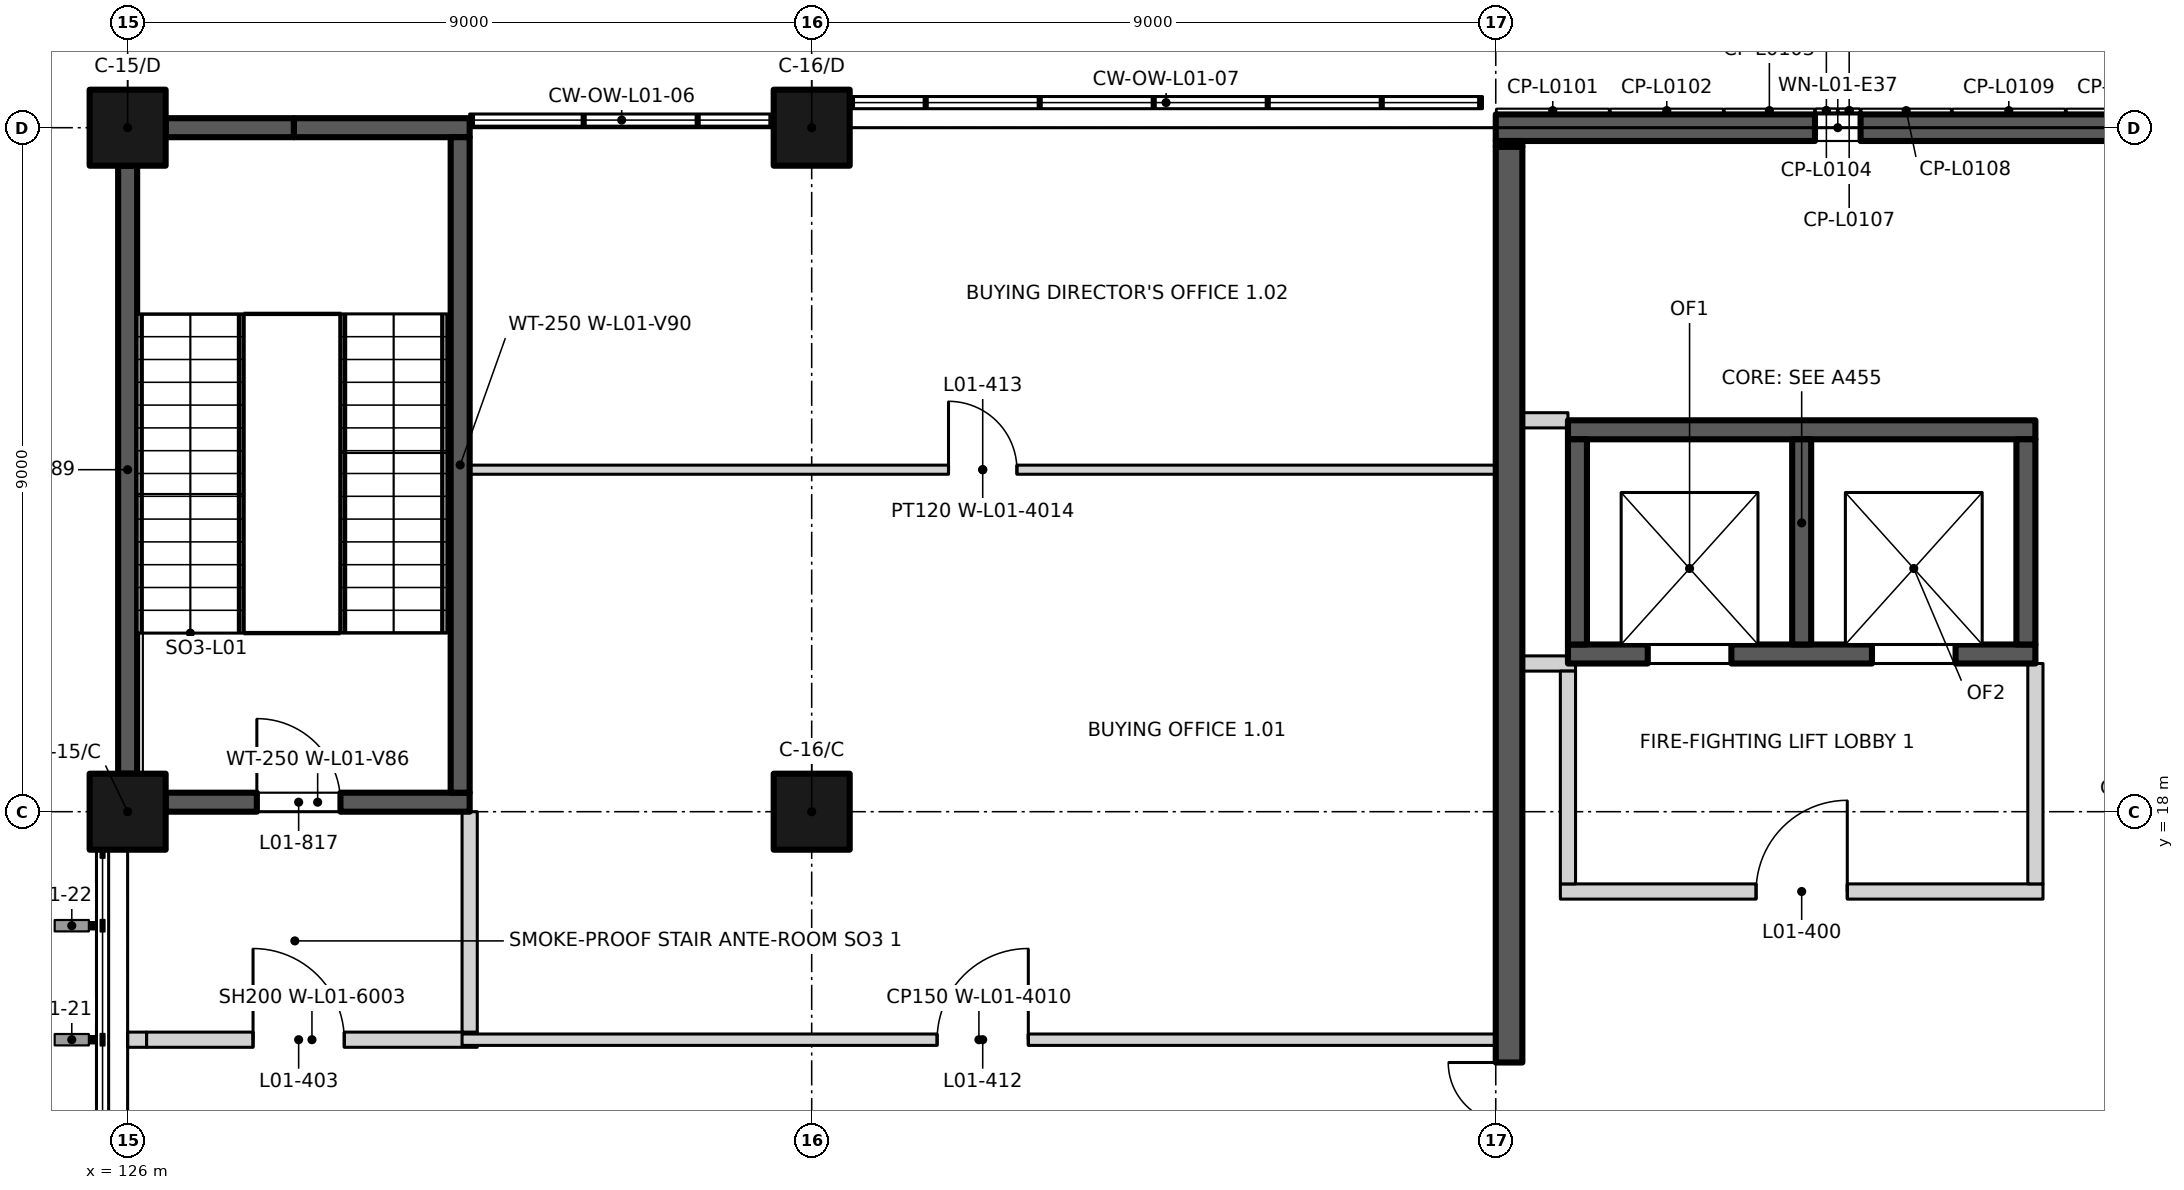
"""IFC4 building model, lengths in metres.
Left out: names, types, materials, properties, quantities, classifications, styles, units other than length and angle.
Written with IfcOpenShell. Run it as: python <this file> out.ifc"""

import sys

from ifc_helpers import new_model, si_unit, direction, frame, frame_2d, origin, origin_2d, place, context, subcontext, project, spatial, rectangle, extrude, element, fill, save


model = new_model("IFC4")
c1 = context("Model", 3, precision=1e-05, world=origin(), true_north=direction((0.0, 1.0)))
c2 = subcontext(c1, "Body", "Model", "MODEL_VIEW")
j1 = project(units=[si_unit("LENGTHUNIT", "METRE"), si_unit("PLANEANGLEUNIT", "RADIAN")], contexts=[c1])
p1 = place(None, origin())
s1 = spatial("IfcSite", under=j1, at=p1, CompositionType="ELEMENT")
p2 = place(p1, origin())
s2 = spatial("IfcBuilding", under=s1, at=p2, CompositionType="ELEMENT")
p3 = place(p2, frame((0.0, 0.0, 6.0)))
s3 = spatial("IfcBuildingStorey", under=s2, at=p3, CompositionType="ELEMENT", Elevation=6.0)
for number, where, z_axis, x_axis in (
    (1, (126.0, 18.0, 0.0), (0.0, 0.0, 1.0), (1.0, 0.0, 0.0)),
    (2, (135.0, 18.0, 0.0), (0.0, 0.0, 1.0), (1.0, 0.0, 0.0)),
    (3, (126.0, 27.0, 0.0), (0.0, 0.0, 1.0), (1.0, 0.0, 0.0)),
    (4, (135.0, 27.0, 0.0), (0.0, 0.0, 1.0), (1.0, 0.0, 0.0)),
):
    element("IfcColumn", number, at=place(p3, frame(where, z_axis=z_axis, x_axis=x_axis)), inside=s3, PredefinedType="COLUMN", context=c2, shape_type="SweptSolid", body=[
        extrude(rectangle(XDim=1.0, YDim=1.0, at=origin_2d()), origin(), (0.0, 0.0, 1.0), 4.5),
    ])
p4 = place(p3, frame((126.5, 18.125, 0.0), z_axis=(0.0, 0.0, 1.0), x_axis=(1.0, 0.0, 0.0)))
e5 = element("IfcWall", 5, at=p4, inside=s3, PredefinedType="SHEAR", context=c2, shape_type="SweptSolid", body=[
    extrude(rectangle(XDim=4.0, YDim=0.25, at=frame_2d((2.0, 0.0))), origin(), (0.0, 0.0, 1.0), 4.5),
])
p5 = place(p4, frame((1.2, 0.0, 0.0)))
e6 = element("IfcOpeningElement", 6, at=p5, cuts=e5, PredefinedType="OPENING", context=c2, shape_type="SweptSolid", body=[
    extrude(rectangle(XDim=1.1, YDim=2.1, at=frame_2d((0.55, 1.05))), frame((0.0, 0.135, 0.0), z_axis=(0.0, -1.0, 0.0), x_axis=(1.0, 0.0, 0.0)), (0.0, 0.0, 1.0), 0.27),
])
p6 = place(p3, frame((126.5, 27.0, 0.0), z_axis=(0.0, 0.0, 1.0), x_axis=(1.0, 0.0, 0.0)))
e7 = element("IfcWall", 7, at=p6, inside=s3, PredefinedType="SHEAR", context=c2, shape_type="SweptSolid", body=[
    extrude(rectangle(XDim=1.688, YDim=0.25, at=frame_2d((0.844, 0.0))), origin(), (0.0, 0.0, 1.0), 4.5),
])
p7 = place(p3, frame((128.188, 27.0, 0.0), z_axis=(0.0, 0.0, 1.0), x_axis=(1.0, 0.0, 0.0)))
e8 = element("IfcWall", 8, at=p7, inside=s3, PredefinedType="SHEAR", context=c2, shape_type="SweptSolid", body=[
    extrude(rectangle(XDim=2.312, YDim=0.25, at=frame_2d((1.156, 0.0))), origin(), (0.0, 0.0, 1.0), 4.5),
])
p8 = place(p3, frame((126.0, 18.5, 0.0), z_axis=(0.0, 0.0, 1.0), x_axis=(0.0, 1.0, 0.0)))
e9 = element("IfcWall", 9, at=p8, inside=s3, PredefinedType="SHEAR", context=c2, shape_type="SweptSolid", body=[
    extrude(rectangle(XDim=8.0, YDim=0.25, at=frame_2d((4.0, 0.0))), origin(), (0.0, 0.0, 1.0), 4.5),
])
p9 = place(p3, frame((130.375, 18.25, 0.0), z_axis=(0.0, 0.0, 1.0), x_axis=(0.0, 1.0, 0.0)))
e10 = element("IfcWall", 10, at=p9, inside=s3, PredefinedType="SHEAR", context=c2, shape_type="SweptSolid", body=[
    extrude(rectangle(XDim=8.625, YDim=0.25, at=frame_2d((4.312, 0.0))), origin(), (0.0, 0.0, 1.0), 4.5),
])
p10 = place(p3, frame((144.95, 20.075, 0.0), z_axis=(0.0, 0.0, 1.0), x_axis=(1.0, 0.0, 0.0)))
e11 = element("IfcWall", 11, at=p10, inside=s3, PredefinedType="SHEAR", context=c2, shape_type="SweptSolid", body=[
    extrude(rectangle(XDim=6.15, YDim=0.25, at=frame_2d((3.075, 0.0))), origin(), (0.0, 0.0, 1.0), 4.5),
])
p11 = place(p10, frame((1.05, 0.0, 0.0)))
e12 = element("IfcOpeningElement", 12, at=p11, cuts=e11, PredefinedType="OPENING", context=c2, shape_type="SweptSolid", body=[
    extrude(rectangle(XDim=1.1, YDim=2.1, at=frame_2d((0.55, 1.05))), frame((0.0, 0.135, 0.0), z_axis=(0.0, -1.0, 0.0), x_axis=(1.0, 0.0, 0.0)), (0.0, 0.0, 1.0), 0.27),
])
p12 = place(p10, frame((4.0, 0.0, 0.0)))
e13 = element("IfcOpeningElement", 13, at=p12, cuts=e11, PredefinedType="OPENING", context=c2, shape_type="SweptSolid", body=[
    extrude(rectangle(XDim=1.1, YDim=2.1, at=frame_2d((0.55, 1.05))), frame((0.0, 0.135, 0.0), z_axis=(0.0, -1.0, 0.0), x_axis=(1.0, 0.0, 0.0)), (0.0, 0.0, 1.0), 0.27),
])
p13 = place(p3, frame((144.95, 23.025, 0.0), z_axis=(0.0, 0.0, 1.0), x_axis=(1.0, 0.0, 0.0)))
e14 = element("IfcWall", 14, at=p13, inside=s3, PredefinedType="SHEAR", context=c2, shape_type="SweptSolid", body=[
    extrude(rectangle(XDim=6.15, YDim=0.25, at=frame_2d((3.075, 0.0))), origin(), (0.0, 0.0, 1.0), 4.5),
])
for number, where, z_axis, x_axis in (
    (15, (145.075, 20.2, 0.0), (0.0, 0.0, 1.0), (0.0, 1.0, 0.0)),
    (16, (148.025, 20.2, 0.0), (0.0, 0.0, 1.0), (0.0, 1.0, 0.0)),
    (17, (150.975, 20.2, 0.0), (0.0, 0.0, 1.0), (0.0, 1.0, 0.0)),
):
    element("IfcWall", number, at=place(p3, frame(where, z_axis=z_axis, x_axis=x_axis)), inside=s3, PredefinedType="SHEAR", context=c2, shape_type="SweptSolid", body=[
        extrude(rectangle(XDim=2.7, YDim=0.25, at=frame_2d((1.35, 0.0))), origin(), (0.0, 0.0, 1.0), 4.5),
    ])
p14 = place(p3, frame((144.0, 27.0, 0.0), z_axis=(0.0, 0.0, 1.0), x_axis=(1.0, 0.0, 0.0)))
e18 = element("IfcWall", 18, at=p14, inside=s3, PredefinedType="SOLIDWALL", context=c2, shape_type="SweptSolid", body=[
    extrude(rectangle(XDim=18.0, YDim=0.35, at=frame_2d((9.0, 0.0))), origin(), (0.0, 0.0, 1.0), 3.6),
])
p15 = place(p14, frame((4.2, 0.0, 0.6)))
e19 = element("IfcOpeningElement", 19, at=p15, cuts=e18, PredefinedType="OPENING", context=c2, shape_type="SweptSolid", body=[
    extrude(rectangle(XDim=0.6, YDim=2.4, at=frame_2d((0.3, 1.2))), frame((0.0, 0.185, 0.0), z_axis=(0.0, -1.0, 0.0), x_axis=(1.0, 0.0, 0.0)), (0.0, 0.0, 1.0), 0.37),
])
p16 = place(p14, frame((13.2, 0.0, 0.6)))
e20 = element("IfcOpeningElement", 20, at=p16, cuts=e18, PredefinedType="OPENING", context=c2, shape_type="SweptSolid", body=[
    extrude(rectangle(XDim=0.6, YDim=2.4, at=frame_2d((0.3, 1.2))), frame((0.0, 0.185, 0.0), z_axis=(0.0, -1.0, 0.0), x_axis=(1.0, 0.0, 0.0)), (0.0, 0.0, 1.0), 0.37),
])
p17 = place(p3, frame((126.0, 15.0, 0.0), z_axis=(0.0, 0.0, 1.0), x_axis=(1.0, 0.0, 0.0)))
e21 = element("IfcWall", 21, at=p17, inside=s3, PredefinedType="PARTITIONING", context=c2, shape_type="SweptSolid", body=[
    extrude(rectangle(XDim=0.25, YDim=0.2, at=frame_2d((0.125, 0.0))), origin(), (0.0, 0.0, 1.0), 3.6),
])
p18 = place(p3, frame((126.25, 15.0, 0.0), z_axis=(0.0, 0.0, 1.0), x_axis=(1.0, 0.0, 0.0)))
e22 = element("IfcWall", 22, at=p18, inside=s3, PredefinedType="PARTITIONING", context=c2, shape_type="SweptSolid", body=[
    extrude(rectangle(XDim=4.35, YDim=0.2, at=frame_2d((2.175, 0.0))), origin(), (0.0, 0.0, 1.0), 4.2),
])
p19 = place(p18, frame((1.4, 0.0, 0.0)))
e23 = element("IfcOpeningElement", 23, at=p19, cuts=e22, PredefinedType="OPENING", context=c2, shape_type="SweptSolid", body=[
    extrude(rectangle(XDim=1.2, YDim=2.1, at=frame_2d((0.6, 1.05))), frame((0.0, 0.11, 0.0), z_axis=(0.0, -1.0, 0.0), x_axis=(1.0, 0.0, 0.0)), (0.0, 0.0, 1.0), 0.22),
])
p20 = place(p3, frame((130.4, 15.0, 0.0), z_axis=(0.0, 0.0, 1.0), x_axis=(1.0, 0.0, 0.0)))
e24 = element("IfcWall", 24, at=p20, inside=s3, PredefinedType="PARTITIONING", context=c2, shape_type="SweptSolid", body=[
    extrude(rectangle(XDim=13.6, YDim=0.15, at=frame_2d((6.8, 0.0))), origin(), (0.0, 0.0, 1.0), 4.2),
])
p21 = place(p20, frame((6.25, 0.0, 0.0)))
e25 = element("IfcOpeningElement", 25, at=p21, cuts=e24, PredefinedType="OPENING", context=c2, shape_type="SweptSolid", body=[
    extrude(rectangle(XDim=1.2, YDim=2.1, at=frame_2d((0.6, 1.05))), frame((0.0, 0.085, 0.0), z_axis=(0.0, -1.0, 0.0), x_axis=(1.0, 0.0, 0.0)), (0.0, 0.0, 1.0), 0.17),
])
p22 = place(p3, frame((144.85, 16.95, 0.0), z_axis=(0.0, 0.0, 1.0), x_axis=(1.0, 0.0, 0.0)))
e26 = element("IfcWall", 26, at=p22, inside=s3, PredefinedType="PARTITIONING", context=c2, shape_type="SweptSolid", body=[
    extrude(rectangle(XDim=6.35, YDim=0.2, at=frame_2d((3.175, 0.0))), origin(), (0.0, 0.0, 1.0), 4.2),
])
p23 = place(p22, frame((2.575, 0.0, 0.0)))
e27 = element("IfcOpeningElement", 27, at=p23, cuts=e26, PredefinedType="OPENING", context=c2, shape_type="SweptSolid", body=[
    extrude(rectangle(XDim=1.2, YDim=2.1, at=frame_2d((0.6, 1.05))), frame((0.0, 0.11, 0.0), z_axis=(0.0, -1.0, 0.0), x_axis=(1.0, 0.0, 0.0)), (0.0, 0.0, 1.0), 0.22),
])
p24 = place(p3, frame((144.35, 19.95, 0.0), z_axis=(0.0, 0.0, 1.0), x_axis=(1.0, 0.0, 0.0)))
e28 = element("IfcWall", 28, at=p24, inside=s3, PredefinedType="PARTITIONING", context=c2, shape_type="SweptSolid", body=[
    extrude(rectangle(XDim=0.7, YDim=0.2, at=frame_2d((0.35, 0.0))), origin(), (0.0, 0.0, 1.0), 4.2),
])
p25 = place(p3, frame((130.5, 22.5, 0.0), z_axis=(0.0, 0.0, 1.0), x_axis=(1.0, 0.0, 0.0)))
e29 = element("IfcWall", 29, at=p25, inside=s3, PredefinedType="PARTITIONING", context=c2, shape_type="SweptSolid", body=[
    extrude(rectangle(XDim=13.5, YDim=0.12, at=frame_2d((6.75, 0.0))), origin(), (0.0, 0.0, 1.0), 4.2),
])
p26 = place(p25, frame((6.3, 0.0, 0.0)))
e30 = element("IfcOpeningElement", 30, at=p26, cuts=e29, PredefinedType="OPENING", context=c2, shape_type="SweptSolid", body=[
    extrude(rectangle(XDim=0.9, YDim=2.1, at=frame_2d((0.45, 1.05))), frame((0.0, 0.07, 0.0), z_axis=(0.0, -1.0, 0.0), x_axis=(1.0, 0.0, 0.0)), (0.0, 0.0, 1.0), 0.14),
])
p27 = place(p3, frame((144.35, 23.15, 0.0), z_axis=(0.0, 0.0, 1.0), x_axis=(1.0, 0.0, 0.0)))
e31 = element("IfcWall", 31, at=p27, inside=s3, PredefinedType="PARTITIONING", context=c2, shape_type="SweptSolid", body=[
    extrude(rectangle(XDim=0.6, YDim=0.2, at=frame_2d((0.3, 0.0))), origin(), (0.0, 0.0, 1.0), 4.2),
])
p28 = place(p3, frame((130.5, 15.1, 0.0), z_axis=(0.0, 0.0, 1.0), x_axis=(0.0, 1.0, 0.0)))
e32 = element("IfcWall", 32, at=p28, inside=s3, PredefinedType="PARTITIONING", context=c2, shape_type="SweptSolid", body=[
    extrude(rectangle(XDim=2.9, YDim=0.2, at=frame_2d((1.45, 0.0))), origin(), (0.0, 0.0, 1.0), 4.2),
])
p29 = place(p3, frame((144.175, 9.35, 0.0), z_axis=(0.0, 0.0, 1.0), x_axis=(0.0, 1.0, 0.0)))
e33 = element("IfcWall", 33, at=p29, inside=s3, PredefinedType="SHEAR", context=c2, shape_type="SweptSolid", body=[
    extrude(rectangle(XDim=17.4, YDim=0.35, at=frame_2d((8.7, 0.0))), origin(), (0.0, 0.0, 1.0), 4.2),
])
p30 = place(p29, frame((3.75, 0.0, 0.0)))
e34 = element("IfcOpeningElement", 34, at=p30, cuts=e33, PredefinedType="OPENING", context=c2, shape_type="SweptSolid", body=[
    extrude(rectangle(XDim=1.6, YDim=2.4, at=frame_2d((0.8, 1.2))), frame((0.0, 0.185, 0.0), z_axis=(0.0, -1.0, 0.0), x_axis=(1.0, 0.0, 0.0)), (0.0, 0.0, 1.0), 0.37),
])
p31 = place(p3, frame((144.175, 26.75, 0.0), z_axis=(0.0, 0.0, 1.0), x_axis=(0.0, 1.0, 0.0)))
e35 = element("IfcWall", 35, at=p31, inside=s3, PredefinedType="SHEAR", context=c2, shape_type="SweptSolid", body=[
    extrude(rectangle(XDim=0.075, YDim=0.35, at=frame_2d((0.038, 0.0))), origin(), (0.0, 0.0, 1.0), 3.6),
])
p32 = place(p3, frame((144.95, 17.05, 0.0), z_axis=(0.0, 0.0, 1.0), x_axis=(0.0, 1.0, 0.0)))
e36 = element("IfcWall", 36, at=p32, inside=s3, PredefinedType="PARTITIONING", context=c2, shape_type="SweptSolid", body=[
    extrude(rectangle(XDim=2.8, YDim=0.2, at=frame_2d((1.4, 0.0))), origin(), (0.0, 0.0, 1.0), 4.2),
])
p33 = place(p3, frame((151.1, 17.05, 0.0), z_axis=(0.0, 0.0, 1.0), x_axis=(0.0, 1.0, 0.0)))
e37 = element("IfcWall", 37, at=p33, inside=s3, PredefinedType="PARTITIONING", context=c2, shape_type="SweptSolid", body=[
    extrude(rectangle(XDim=2.9, YDim=0.2, at=frame_2d((1.45, 0.0))), origin(), (0.0, 0.0, 1.0), 4.2),
])
p34 = place(p5, origin())
e38 = element("IfcDoor", 38, at=p34, inside=s3, OperationType="SINGLE_SWING_LEFT", PredefinedType="DOOR", context=c2, shape_type="SweptSolid", body=[
    extrude(rectangle(XDim=1.1, YDim=2.1, at=frame_2d((0.55, 1.05))), frame((0.0, 0.025, 0.0), z_axis=(0.0, -1.0, 0.0), x_axis=(1.0, 0.0, 0.0)), (0.0, 0.0, 1.0), 0.05),
])
fill(e6, e38)
p35 = place(p11, origin())
e39 = element("IfcDoor", 39, at=p35, inside=s3, OperationType="DOUBLE_DOOR_SLIDING", PredefinedType="DOOR", context=c2, shape_type="SweptSolid", body=[
    extrude(rectangle(XDim=1.1, YDim=2.1, at=frame_2d((0.55, 1.05))), frame((0.0, 0.025, 0.0), z_axis=(0.0, -1.0, 0.0), x_axis=(1.0, 0.0, 0.0)), (0.0, 0.0, 1.0), 0.05),
])
fill(e12, e39)
p36 = place(p12, origin())
e40 = element("IfcDoor", 40, at=p36, inside=s3, OperationType="DOUBLE_DOOR_SLIDING", PredefinedType="DOOR", context=c2, shape_type="SweptSolid", body=[
    extrude(rectangle(XDim=1.1, YDim=2.1, at=frame_2d((0.55, 1.05))), frame((0.0, 0.025, 0.0), z_axis=(0.0, -1.0, 0.0), x_axis=(1.0, 0.0, 0.0)), (0.0, 0.0, 1.0), 0.05),
])
fill(e13, e40)
p37 = place(p15, origin())
e41 = element("IfcWindow", 41, at=p37, inside=s3, PartitioningType="SINGLE_PANEL", PredefinedType="WINDOW", context=c2, shape_type="SweptSolid", body=[
    extrude(rectangle(XDim=0.6, YDim=2.4, at=frame_2d((0.3, 1.2))), frame((0.0, -0.005, 0.0), z_axis=(0.0, -1.0, 0.0), x_axis=(1.0, 0.0, 0.0)), (0.0, 0.0, 1.0), 0.06),
])
fill(e19, e41)
p38 = place(p23, origin())
e42 = element("IfcDoor", 42, at=p38, inside=s3, OperationType="SINGLE_SWING_RIGHT", PredefinedType="DOOR", context=c2, shape_type="SweptSolid", body=[
    extrude(rectangle(XDim=1.2, YDim=2.1, at=frame_2d((0.6, 1.05))), frame((0.0, 0.025, 0.0), z_axis=(0.0, -1.0, 0.0), x_axis=(1.0, 0.0, 0.0)), (0.0, 0.0, 1.0), 0.05),
])
fill(e27, e42)
p39 = place(p19, origin())
e43 = element("IfcDoor", 43, at=p39, inside=s3, OperationType="SINGLE_SWING_LEFT", PredefinedType="DOOR", context=c2, shape_type="SweptSolid", body=[
    extrude(rectangle(XDim=1.2, YDim=2.1, at=frame_2d((0.6, 1.05))), frame((0.0, 0.025, 0.0), z_axis=(0.0, -1.0, 0.0), x_axis=(1.0, 0.0, 0.0)), (0.0, 0.0, 1.0), 0.05),
])
fill(e23, e43)
p40 = place(p30, origin())
e44 = element("IfcDoor", 44, at=p40, inside=s3, OperationType="DOUBLE_DOOR_SINGLE_SWING", PredefinedType="DOOR", context=c2, shape_type="SweptSolid", body=[
    extrude(rectangle(XDim=1.6, YDim=2.4, at=frame_2d((0.8, 1.2))), frame((0.0, 0.025, 0.0), z_axis=(0.0, -1.0, 0.0), x_axis=(1.0, 0.0, 0.0)), (0.0, 0.0, 1.0), 0.05),
])
fill(e34, e44)
p41 = place(p21, origin())
e45 = element("IfcDoor", 45, at=p41, inside=s3, OperationType="SINGLE_SWING_RIGHT", PredefinedType="DOOR", context=c2, shape_type="SweptSolid", body=[
    extrude(rectangle(XDim=1.2, YDim=2.1, at=frame_2d((0.6, 1.05))), frame((0.0, 0.025, 0.0), z_axis=(0.0, -1.0, 0.0), x_axis=(1.0, 0.0, 0.0)), (0.0, 0.0, 1.0), 0.05),
])
fill(e25, e45)
p42 = place(p26, origin())
e46 = element("IfcDoor", 46, at=p42, inside=s3, OperationType="SINGLE_SWING_LEFT", PredefinedType="DOOR", context=c2, shape_type="SweptSolid", body=[
    extrude(rectangle(XDim=0.9, YDim=2.1, at=frame_2d((0.45, 1.05))), frame((0.0, 0.025, 0.0), z_axis=(0.0, -1.0, 0.0), x_axis=(1.0, 0.0, 0.0)), (0.0, 0.0, 1.0), 0.05),
])
fill(e30, e46)
save(model, sys.argv[1])
